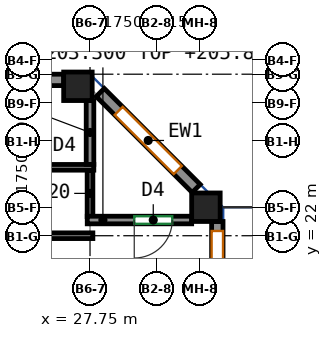
"""IFC4 building model, lengths in metres.
Left out: names, types, materials, properties, quantities, classifications, styles, units other than length and angle.
Written with IfcOpenShell. Run it as: python <this file> out.ifc"""

import sys

from ifc_helpers import new_model, si_unit, direction, frame, frame_2d, origin, origin_2d, place, context, subcontext, project, spatial, rectangle, extrude, source, transform, mapped, element, fill, save


model = new_model("IFC4")
c1 = context("Model", 3, precision=1e-05, world=origin(), true_north=direction((0.0, 1.0)))
c2 = subcontext(c1, "Body", "Model", "MODEL_VIEW")
j1 = project(units=[si_unit("LENGTHUNIT", "METRE"), si_unit("PLANEANGLEUNIT", "RADIAN")], contexts=[c1])
p1 = place(None, origin())
s1 = spatial("IfcSite", under=j1, at=p1, CompositionType="ELEMENT")
p2 = place(p1, origin())
s2 = spatial("IfcBuilding", under=s1, at=p2, CompositionType="ELEMENT")
p3 = place(p2, frame((0.0, 0.0, 203.3)))
s3 = spatial("IfcBuildingStorey", under=s2, at=p3, CompositionType="ELEMENT", Elevation=203.3)
m1 = source(origin(), c2, "Body", "SweptSolid", [
    extrude(rectangle(XDim=0.75, YDim=0.75, at=origin_2d()), origin(), (0.0, 0.0, 1.0), 3.12),
])
for number, where, z_axis, x_axis in (
    (1, (27.432, 25.932, 0.0), (0.0, 0.0, 1.0), (1.0, 0.0, 0.0)),
    (2, (30.8, 22.75, 0.0), (0.0, 0.0, 1.0), (1.0, 0.0, 0.0)),
):
    element("IfcColumn", number, at=place(p3, frame(where, z_axis=z_axis, x_axis=x_axis)), inside=s3, PredefinedType="COLUMN", context=c2, shape_type="MappedRepresentation", body=[
        mapped(m1, transform((0.0, 0.0, 0.0))),
    ])
m2 = source(origin(), c2, "Body", "SweptSolid", [
    extrude(rectangle(XDim=14.0, YDim=0.3, at=frame_2d((7.0, 0.0))), origin(), (0.0, 0.0, 1.0), 3.12),
])
p4 = place(p3, frame((31.1, 8.375, 0.0), z_axis=(0.0, 0.0, 1.0), x_axis=(0.0, 1.0, 0.0)))
e3 = element("IfcWall", 3, at=p4, inside=s3, PredefinedType="SOLIDWALL", context=c2, shape_type="MappedRepresentation", body=[
    mapped(m2, transform((0.0, 0.0, 0.0))),
])
p5 = place(p4, frame((1.75, 0.0, 0.85)))
e4 = element("IfcOpeningElement", 4, at=p5, cuts=e3, PredefinedType="OPENING", context=c2, shape_type="SweptSolid", body=[
    extrude(rectangle(XDim=1.5, YDim=1.95, at=frame_2d((0.75, 0.975))), frame((0.0, 0.16, 0.0), z_axis=(0.0, -1.0, 0.0), x_axis=(1.0, 0.0, 0.0)), (0.0, 0.0, 1.0), 0.32),
])
p6 = place(p4, frame((5.25, 0.0, 0.85)))
e5 = element("IfcOpeningElement", 5, at=p6, cuts=e3, PredefinedType="OPENING", context=c2, shape_type="SweptSolid", body=[
    extrude(rectangle(XDim=1.5, YDim=1.95, at=frame_2d((0.75, 0.975))), frame((0.0, 0.16, 0.0), z_axis=(0.0, -1.0, 0.0), x_axis=(1.0, 0.0, 0.0)), (0.0, 0.0, 1.0), 0.32),
])
p7 = place(p4, frame((8.75, 0.0, 0.85)))
e6 = element("IfcOpeningElement", 6, at=p7, cuts=e3, PredefinedType="OPENING", context=c2, shape_type="SweptSolid", body=[
    extrude(rectangle(XDim=1.5, YDim=1.95, at=frame_2d((0.75, 0.975))), frame((0.0, 0.16, 0.0), z_axis=(0.0, -1.0, 0.0), x_axis=(1.0, 0.0, 0.0)), (0.0, 0.0, 1.0), 0.32),
])
p8 = place(p4, frame((12.25, 0.0, 0.85)))
e7 = element("IfcOpeningElement", 7, at=p8, cuts=e3, PredefinedType="OPENING", context=c2, shape_type="SweptSolid", body=[
    extrude(rectangle(XDim=1.5, YDim=1.95, at=frame_2d((0.75, 0.975))), frame((0.0, 0.16, 0.0), z_axis=(0.0, -1.0, 0.0), x_axis=(1.0, 0.0, 0.0)), (0.0, 0.0, 1.0), 0.32),
])
m3 = source(origin(), c2, "Body", "SweptSolid", [
    extrude(rectangle(XDim=3.571, YDim=0.3, at=frame_2d((1.786, 0.0))), origin(), (0.0, 0.0, 1.0), 3.12),
])
p9 = place(p3, frame((30.544, 23.244, 0.0), z_axis=(0.0, 0.0, 1.0), x_axis=(-0.707140964879, 0.707072595841, 0.0)))
e8 = element("IfcWall", 8, at=p9, inside=s3, PredefinedType="SOLIDWALL", context=c2, shape_type="MappedRepresentation", body=[
    mapped(m3, transform((0.0, 0.0, 0.0))),
])
p10 = place(p9, frame((0.686, 0.0, 0.85)))
e9 = element("IfcOpeningElement", 9, at=p10, cuts=e8, PredefinedType="OPENING", context=c2, shape_type="SweptSolid", body=[
    extrude(rectangle(XDim=2.2, YDim=1.95, at=frame_2d((1.1, 0.975))), frame((0.0, 0.16, 0.0), z_axis=(0.0, -1.0, 0.0), x_axis=(1.0, 0.0, 0.0)), (0.0, 0.0, 1.0), 0.32),
])
m4 = source(origin(), c2, "Body", "SweptSolid", [
    extrude(rectangle(XDim=6.515, YDim=0.3, at=frame_2d((3.258, 0.0))), origin(), (0.0, 0.0, 1.0), 3.12),
])
p11 = place(p3, frame((27.057, 26.1, 0.0), z_axis=(0.0, 0.0, 1.0), x_axis=(-1.0, 0.0, 0.0)))
e10 = element("IfcWall", 10, at=p11, inside=s3, PredefinedType="SOLIDWALL", context=c2, shape_type="MappedRepresentation", body=[
    mapped(m4, transform((0.0, 0.0, 0.0))),
])
p12 = place(p11, frame((0.529, 0.0, 0.85)))
e11 = element("IfcOpeningElement", 11, at=p12, cuts=e10, PredefinedType="OPENING", context=c2, shape_type="SweptSolid", body=[
    extrude(rectangle(XDim=2.2, YDim=1.95, at=frame_2d((1.1, 0.975))), frame((0.0, 0.16, 0.0), z_axis=(0.0, -1.0, 0.0), x_axis=(1.0, 0.0, 0.0)), (0.0, 0.0, 1.0), 0.32),
])
p13 = place(p11, frame((3.786, 0.0, 0.85)))
e12 = element("IfcOpeningElement", 12, at=p13, cuts=e10, PredefinedType="OPENING", context=c2, shape_type="SweptSolid", body=[
    extrude(rectangle(XDim=2.2, YDim=1.95, at=frame_2d((1.1, 0.975))), frame((0.0, 0.16, 0.0), z_axis=(0.0, -1.0, 0.0), x_axis=(1.0, 0.0, 0.0)), (0.0, 0.0, 1.0), 0.32),
])
p14 = place(p3, frame((20.667, 22.0, 0.0), z_axis=(0.0, 0.0, 1.0), x_axis=(1.0, 0.0, 0.0)))
e13 = element("IfcWall", 13, at=p14, inside=s3, PredefinedType="PARTITIONING", context=c2, shape_type="SweptSolid", body=[
    extrude(rectangle(XDim=7.158, YDim=0.15, at=frame_2d((3.579, 0.0))), origin(), (0.0, 0.0, 1.0), 3.12),
])
p15 = place(p3, frame((27.75, 22.503, 0.0), z_axis=(0.0, 0.0, 1.0), x_axis=(0.0, 1.0, 0.0)))
e14 = element("IfcWall", 14, at=p15, inside=s3, PredefinedType="PARTITIONING", context=c2, shape_type="SweptSolid", body=[
    extrude(rectangle(XDim=1.222, YDim=0.15, at=frame_2d((0.611, 0.0))), origin(), (0.0, 0.0, 1.0), 2.52),
])
p16 = place(p3, frame((-17.85, 23.8, 0.0), z_axis=(0.0, 0.0, 1.0), x_axis=(1.0, 0.0, 0.0)))
e15 = element("IfcWall", 15, at=p16, inside=s3, PredefinedType="PARTITIONING", context=c2, shape_type="SweptSolid", body=[
    extrude(rectangle(XDim=45.7, YDim=0.15, at=frame_2d((22.85, 0.0))), origin(), (0.0, 0.0, 1.0), 3.12),
])
p17 = place(p16, frame((0.6, 0.0, 0.0)))
e16 = element("IfcOpeningElement", 16, at=p17, cuts=e15, PredefinedType="OPENING", context=c2, shape_type="SweptSolid", body=[
    extrude(rectangle(XDim=0.9, YDim=2.1, at=frame_2d((0.45, 1.05))), frame((0.0, 0.085, 0.0), z_axis=(0.0, -1.0, 0.0), x_axis=(1.0, 0.0, 0.0)), (0.0, 0.0, 1.0), 0.17),
])
p18 = place(p16, frame((4.081, 0.0, 0.0)))
e17 = element("IfcOpeningElement", 17, at=p18, cuts=e15, PredefinedType="OPENING", context=c2, shape_type="SweptSolid", body=[
    extrude(rectangle(XDim=1.0, YDim=2.1, at=frame_2d((0.5, 1.05))), frame((0.0, 0.085, 0.0), z_axis=(0.0, -1.0, 0.0), x_axis=(1.0, 0.0, 0.0)), (0.0, 0.0, 1.0), 0.17),
])
p19 = place(p16, frame((9.481, 0.0, 0.0)))
e18 = element("IfcOpeningElement", 18, at=p19, cuts=e15, PredefinedType="OPENING", context=c2, shape_type="SweptSolid", body=[
    extrude(rectangle(XDim=0.9, YDim=2.1, at=frame_2d((0.45, 1.05))), frame((0.0, 0.085, 0.0), z_axis=(0.0, -1.0, 0.0), x_axis=(1.0, 0.0, 0.0)), (0.0, 0.0, 1.0), 0.17),
])
p20 = place(p16, frame((12.803, 0.0, 0.0)))
e19 = element("IfcOpeningElement", 19, at=p20, cuts=e15, PredefinedType="OPENING", context=c2, shape_type="SweptSolid", body=[
    extrude(rectangle(XDim=1.0, YDim=2.1, at=frame_2d((0.5, 1.05))), frame((0.0, 0.085, 0.0), z_axis=(0.0, -1.0, 0.0), x_axis=(1.0, 0.0, 0.0)), (0.0, 0.0, 1.0), 0.17),
])
p21 = place(p16, frame((15.489, 0.0, 0.0)))
e20 = element("IfcOpeningElement", 20, at=p21, cuts=e15, PredefinedType="OPENING", context=c2, shape_type="SweptSolid", body=[
    extrude(rectangle(XDim=0.9, YDim=2.1, at=frame_2d((0.45, 1.05))), frame((0.0, 0.085, 0.0), z_axis=(0.0, -1.0, 0.0), x_axis=(1.0, 0.0, 0.0)), (0.0, 0.0, 1.0), 0.17),
])
p22 = place(p16, frame((21.244, 0.0, 0.0)))
e21 = element("IfcOpeningElement", 21, at=p22, cuts=e15, PredefinedType="OPENING", context=c2, shape_type="SweptSolid", body=[
    extrude(rectangle(XDim=0.9, YDim=2.1, at=frame_2d((0.45, 1.05))), frame((0.0, 0.085, 0.0), z_axis=(0.0, -1.0, 0.0), x_axis=(1.0, 0.0, 0.0)), (0.0, 0.0, 1.0), 0.17),
])
p23 = place(p16, frame((23.542, 0.0, 0.0)))
e22 = element("IfcOpeningElement", 22, at=p23, cuts=e15, PredefinedType="OPENING", context=c2, shape_type="SweptSolid", body=[
    extrude(rectangle(XDim=1.0, YDim=2.1, at=frame_2d((0.5, 1.05))), frame((0.0, 0.085, 0.0), z_axis=(0.0, -1.0, 0.0), x_axis=(1.0, 0.0, 0.0)), (0.0, 0.0, 1.0), 0.17),
])
p24 = place(p16, frame((28.841, 0.0, 0.0)))
e23 = element("IfcOpeningElement", 23, at=p24, cuts=e15, PredefinedType="OPENING", context=c2, shape_type="SweptSolid", body=[
    extrude(rectangle(XDim=0.9, YDim=2.1, at=frame_2d((0.45, 1.05))), frame((0.0, 0.085, 0.0), z_axis=(0.0, -1.0, 0.0), x_axis=(1.0, 0.0, 0.0)), (0.0, 0.0, 1.0), 0.17),
])
p25 = place(p16, frame((32.331, 0.0, 0.0)))
e24 = element("IfcOpeningElement", 24, at=p25, cuts=e15, PredefinedType="OPENING", context=c2, shape_type="SweptSolid", body=[
    extrude(rectangle(XDim=1.0, YDim=2.1, at=frame_2d((0.5, 1.05))), frame((0.0, 0.085, 0.0), z_axis=(0.0, -1.0, 0.0), x_axis=(1.0, 0.0, 0.0)), (0.0, 0.0, 1.0), 0.17),
])
p26 = place(p16, frame((35.42, 0.0, 0.0)))
e25 = element("IfcOpeningElement", 25, at=p26, cuts=e15, PredefinedType="OPENING", context=c2, shape_type="SweptSolid", body=[
    extrude(rectangle(XDim=0.9, YDim=2.1, at=frame_2d((0.45, 1.05))), frame((0.0, 0.085, 0.0), z_axis=(0.0, -1.0, 0.0), x_axis=(1.0, 0.0, 0.0)), (0.0, 0.0, 1.0), 0.17),
])
p27 = place(p16, frame((40.317, 0.0, 0.0)))
e26 = element("IfcOpeningElement", 26, at=p27, cuts=e15, PredefinedType="OPENING", context=c2, shape_type="SweptSolid", body=[
    extrude(rectangle(XDim=0.9, YDim=2.1, at=frame_2d((0.45, 1.05))), frame((0.0, 0.085, 0.0), z_axis=(0.0, -1.0, 0.0), x_axis=(1.0, 0.0, 0.0)), (0.0, 0.0, 1.0), 0.17),
])
p28 = place(p16, frame((43.199, 0.0, 0.0)))
e27 = element("IfcOpeningElement", 27, at=p28, cuts=e15, PredefinedType="OPENING", context=c2, shape_type="SweptSolid", body=[
    extrude(rectangle(XDim=1.0, YDim=2.1, at=frame_2d((0.5, 1.05))), frame((0.0, 0.085, 0.0), z_axis=(0.0, -1.0, 0.0), x_axis=(1.0, 0.0, 0.0)), (0.0, 0.0, 1.0), 0.17),
])
p29 = place(p3, frame((30.425, 22.413, 0.0), z_axis=(0.0, 0.0, 1.0), x_axis=(-1.0, 0.0, 0.0)))
e28 = element("IfcWall", 28, at=p29, inside=s3, PredefinedType="PARTITIONING", context=c2, shape_type="SweptSolid", body=[
    extrude(rectangle(XDim=2.748, YDim=0.2, at=frame_2d((1.374, 0.0))), origin(), (0.0, 0.0, 1.0), 2.52),
])
p30 = place(p29, frame((0.511, 0.0, 0.0)))
e29 = element("IfcOpeningElement", 29, at=p30, cuts=e28, PredefinedType="OPENING", context=c2, shape_type="SweptSolid", body=[
    extrude(rectangle(XDim=1.0, YDim=2.1, at=frame_2d((0.5, 1.05))), frame((0.0, 0.11, 0.0), z_axis=(0.0, -1.0, 0.0), x_axis=(1.0, 0.0, 0.0)), (0.0, 0.0, 1.0), 0.22),
])
p31 = place(p3, frame((27.75, 25.557, 0.0), z_axis=(0.0, 0.0, 1.0), x_axis=(0.0, -1.0, 0.0)))
e30 = element("IfcWall", 30, at=p31, inside=s3, PredefinedType="PARTITIONING", context=c2, shape_type="SweptSolid", body=[
    extrude(rectangle(XDim=1.68, YDim=0.2, at=frame_2d((0.84, 0.0))), origin(), (0.0, 0.0, 1.0), 2.52),
])
p32 = place(p8, origin())
e31 = element("IfcWindow", 31, at=p32, inside=s3, PartitioningType="SINGLE_PANEL", PredefinedType="WINDOW", context=c2, shape_type="SweptSolid", body=[
    extrude(rectangle(XDim=1.5, YDim=1.95, at=frame_2d((0.75, 0.975))), frame((0.0, 0.03, 0.0), z_axis=(0.0, -1.0, 0.0), x_axis=(1.0, 0.0, 0.0)), (0.0, 0.0, 1.0), 0.06),
])
fill(e7, e31)
p33 = place(p10, origin())
e32 = element("IfcWindow", 32, at=p33, inside=s3, PartitioningType="SINGLE_PANEL", PredefinedType="WINDOW", context=c2, shape_type="SweptSolid", body=[
    extrude(rectangle(XDim=2.2, YDim=1.95, at=frame_2d((1.1, 0.975))), frame((0.0, 0.03, 0.0), z_axis=(0.0, -1.0, 0.0), x_axis=(1.0, 0.0, 0.0)), (0.0, 0.0, 1.0), 0.06),
])
fill(e9, e32)
p34 = place(p30, origin())
e33 = element("IfcDoor", 33, at=p34, inside=s3, OperationType="SINGLE_SWING_RIGHT", PredefinedType="DOOR", context=c2, shape_type="SweptSolid", body=[
    extrude(rectangle(XDim=1.0, YDim=2.1, at=frame_2d((0.5, 1.05))), frame((0.0, 0.025, 0.0), z_axis=(0.0, -1.0, 0.0), x_axis=(1.0, 0.0, 0.0)), (0.0, 0.0, 1.0), 0.05),
])
fill(e29, e33)
save(model, sys.argv[1])
